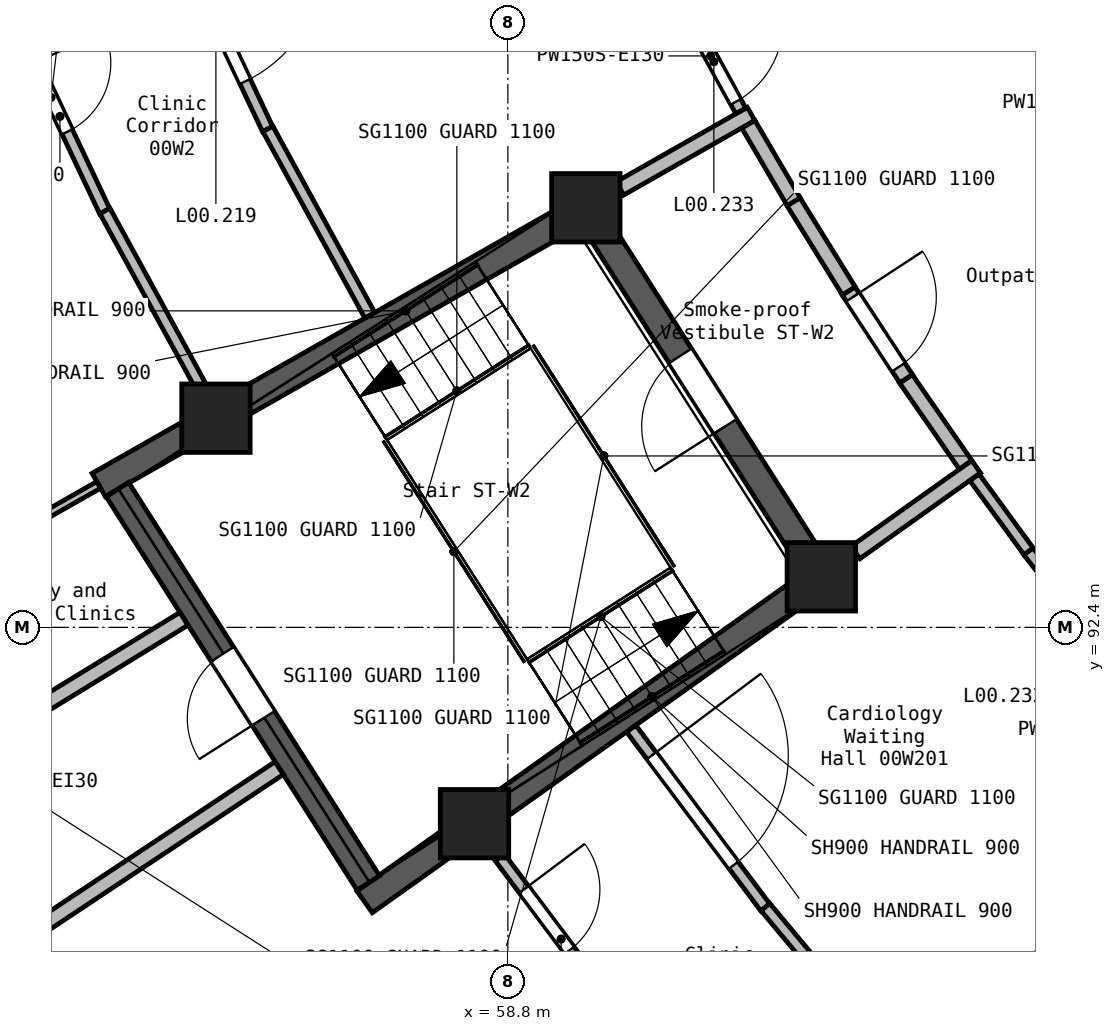
"""IFC4 building model, lengths in metres.
Left out: names, types, materials, properties, quantities, classifications, styles, units other than length and angle.
Written with IfcOpenShell. Run it as: python <this file> out.ifc"""

import sys

from ifc_helpers import new_model, si_unit, direction, frame, frame_2d, origin, origin_2d, place, context, subcontext, project, spatial, rectangle, extrude, element, fill, save


model = new_model("IFC4")
c1 = context("Model", 3, precision=1e-05, world=origin(), true_north=direction((0.0, 1.0)))
c2 = subcontext(c1, "Body", "Model", "MODEL_VIEW")
j1 = project(units=[si_unit("LENGTHUNIT", "METRE"), si_unit("PLANEANGLEUNIT", "RADIAN")], contexts=[c1])
p1 = place(None, origin())
s1 = spatial("IfcSite", under=j1, at=p1, CompositionType="ELEMENT")
p2 = place(p1, origin())
s2 = spatial("IfcBuilding", under=s1, at=p2, CompositionType="ELEMENT")
p3 = place(p2, origin())
s3 = spatial("IfcBuildingStorey", under=s2, at=p3, CompositionType="ELEMENT", Elevation=0.0)
for number, where, z_axis, x_axis in (
    (1, (54.959, 95.152, -0.3), (0.0, 0.0, 1.0), (1.0, 0.0, 0.0)),
    (2, (58.361, 89.817, -0.3), (0.0, 0.0, 1.0), (1.0, 0.0, 0.0)),
    (3, (59.826, 97.92, -0.3), (0.0, 0.0, 1.0), (1.0, 0.0, 0.0)),
    (4, (62.924, 93.065, -0.3), (0.0, 0.0, 1.0), (1.0, 0.0, 0.0)),
):
    element("IfcColumn", number, at=place(p3, frame(where, z_axis=z_axis, x_axis=x_axis)), inside=s3, PredefinedType="COLUMN", context=c2, shape_type="SweptSolid", body=[
        extrude(rectangle(XDim=0.9, YDim=0.9, at=origin_2d()), origin(), (0.0, 0.0, 1.0), 5.7),
    ])
p4 = place(p3, frame((53.416, 94.274, -0.3), z_axis=(0.0, 0.0, 1.0), x_axis=(0.869250335475, 0.494372181941, 0.0)))
e5 = element("IfcWall", 5, at=p4, inside=s3, PredefinedType="SHEAR", context=c2, shape_type="SweptSolid", body=[
    extrude(rectangle(XDim=7.549, YDim=0.35, at=frame_2d((3.775, 0.0))), origin(), (0.0, 0.0, 1.0), 5.7),
])
p5 = place(p3, frame((56.916, 88.789, -0.3), z_axis=(0.0, 0.0, 1.0), x_axis=(0.814717690591, 0.579857814157, 0.0)))
e6 = element("IfcWall", 6, at=p5, inside=s3, PredefinedType="SHEAR", context=c2, shape_type="SweptSolid", body=[
    extrude(rectangle(XDim=7.55, YDim=0.35, at=frame_2d((3.775, 0.0))), origin(), (0.0, 0.0, 1.0), 5.7),
])
p6 = place(p3, frame((56.964, 89.038, -0.3), z_axis=(0.0, 0.0, 1.0), x_axis=(-0.537811796172, 0.843064927451, 0.0)))
e7 = element("IfcWall", 7, at=p6, inside=s3, PredefinedType="SHEAR", context=c2, shape_type="SweptSolid", body=[
    extrude(rectangle(XDim=6.139, YDim=0.35, at=frame_2d((3.07, 0.0))), origin(), (0.0, 0.0, 1.0), 5.7),
])
p7 = place(p6, frame((2.569, 0.0, 0.3)))
e8 = element("IfcOpeningElement", 8, at=p7, cuts=e7, PredefinedType="OPENING", context=c2, shape_type="SweptSolid", body=[
    extrude(rectangle(XDim=1.0, YDim=2.1, at=frame_2d((0.5, 1.05))), frame((0.0, 0.185, 0.0), z_axis=(0.0, -1.0, 0.0), x_axis=(1.0, 0.0, 0.0)), (0.0, 0.0, 1.0), 0.37),
])
p8 = place(p3, frame((62.305, 84.872, -0.3), z_axis=(0.0, 0.0, 1.0), x_axis=(0.751808220443, 0.659381831471, 0.0)))
e9 = element("IfcWall", 9, at=p8, inside=s3, PredefinedType="SHEAR", context=c2, shape_type="SweptSolid", body=[
    extrude(rectangle(XDim=5.75, YDim=0.35, at=frame_2d((2.875, 0.0))), origin(), (0.0, 0.0, 1.0), 5.7),
])
p9 = place(p3, frame((62.83, 93.212, -0.3), z_axis=(0.0, 0.0, 1.0), x_axis=(-0.537903079352, 0.843006688718, 0.0)))
e10 = element("IfcWall", 10, at=p9, inside=s3, PredefinedType="SHEAR", context=c2, shape_type="SweptSolid", body=[
    extrude(rectangle(XDim=5.409, YDim=0.35, at=frame_2d((2.705, 0.0))), origin(), (0.0, 0.0, 1.0), 5.7),
])
p10 = place(p9, frame((2.174, 0.0, 0.3)))
e11 = element("IfcOpeningElement", 11, at=p10, cuts=e10, PredefinedType="OPENING", context=c2, shape_type="SweptSolid", body=[
    extrude(rectangle(XDim=1.1, YDim=2.1, at=frame_2d((0.55, 1.05))), frame((0.0, 0.185, 0.0), z_axis=(0.0, -1.0, 0.0), x_axis=(1.0, 0.0, 0.0)), (0.0, 0.0, 1.0), 0.37),
])
p11 = place(p3, frame((51.154, 87.47, 0.0), z_axis=(0.0, 0.0, 1.0), x_axis=(0.833115109658, 0.553099642071, 0.0)))
e12 = element("IfcWall", 12, at=p11, inside=s3, PredefinedType="SOLIDWALL", context=c2, shape_type="SweptSolid", body=[
    extrude(rectangle(XDim=5.565, YDim=0.2, at=frame_2d((2.783, 0.0))), origin(), (0.0, 0.0, 1.0), 5.05),
])
p12 = place(p3, frame((49.792, 89.605, 0.0), z_axis=(0.0, 0.0, 1.0), x_axis=(0.852773952769, 0.522280179098, 0.0)))
e13 = element("IfcWall", 13, at=p12, inside=s3, PredefinedType="SOLIDWALL", context=c2, shape_type="SweptSolid", body=[
    extrude(rectangle(XDim=5.565, YDim=0.2, at=frame_2d((2.783, 0.0))), origin(), (0.0, 0.0, 1.0), 5.05),
])
p13 = place(p12, frame((2.173, 0.0, 0.0)))
e14 = element("IfcOpeningElement", 14, at=p13, cuts=e13, PredefinedType="OPENING", context=c2, shape_type="SweptSolid", body=[
    extrude(rectangle(XDim=1.0, YDim=2.1, at=frame_2d((0.5, 1.05))), frame((0.0, 0.11, 0.0), z_axis=(0.0, -1.0, 0.0), x_axis=(1.0, 0.0, 0.0)), (0.0, 0.0, 1.0), 0.22),
])
p14 = place(p3, frame((60.274, 98.175, 0.0), z_axis=(0.0, 0.0, 1.0), x_axis=(0.869398915424, 0.494110843698, 0.0)))
e15 = element("IfcWall", 15, at=p14, inside=s3, PredefinedType="SOLIDWALL", context=c2, shape_type="SweptSolid", body=[
    extrude(rectangle(XDim=1.985, YDim=0.2, at=frame_2d((0.992, 0.0))), origin(), (0.0, 0.0, 1.0), 5.05),
])
p15 = place(p3, frame((63.374, 93.385, 0.0), z_axis=(0.0, 0.0, 1.0), x_axis=(0.814765781477, 0.579790239081, 0.0)))
e16 = element("IfcWall", 16, at=p15, inside=s3, PredefinedType="SOLIDWALL", context=c2, shape_type="SweptSolid", body=[
    extrude(rectangle(XDim=1.947, YDim=0.2, at=frame_2d((0.974, 0.0))), origin(), (0.0, 0.0, 1.0), 5.05),
])
p16 = place(p3, frame((64.036, 95.672, 0.0), z_axis=(0.0, 0.0, 1.0), x_axis=(0.569771647524, -0.821803060153, 0.0)))
e17 = element("IfcWall", 17, at=p16, inside=s3, PredefinedType="SOLIDWALL", context=c2, shape_type="SweptSolid", body=[
    extrude(rectangle(XDim=1.378, YDim=0.2, at=frame_2d((0.689, 0.0))), origin(), (0.0, 0.0, 1.0), 5.05),
])
p17 = place(p3, frame((63.282, 96.828, 0.0), z_axis=(0.0, 0.0, 1.0), x_axis=(0.54791545279, -0.836533715156, 0.0)))
e18 = element("IfcWall", 18, at=p17, inside=s3, PredefinedType="SOLIDWALL", context=c2, shape_type="SweptSolid", body=[
    extrude(rectangle(XDim=1.382, YDim=0.2, at=frame_2d((0.691, 0.0))), origin(), (0.0, 0.0, 1.0), 5.05),
])
p18 = place(p17, frame((0.1, 0.0, 0.0)))
e19 = element("IfcOpeningElement", 19, at=p18, cuts=e18, PredefinedType="OPENING", context=c2, shape_type="SweptSolid", body=[
    extrude(rectangle(XDim=1.1, YDim=2.1, at=frame_2d((0.55, 1.05))), frame((0.0, 0.11, 0.0), z_axis=(0.0, -1.0, 0.0), x_axis=(1.0, 0.0, 0.0)), (0.0, 0.0, 1.0), 0.22),
])
p19 = place(p3, frame((62.557, 98.001, 0.0), z_axis=(0.0, 0.0, 1.0), x_axis=(0.526993282669, -0.849869448811, 0.0)))
e20 = element("IfcWall", 20, at=p19, inside=s3, PredefinedType="SOLIDWALL", context=c2, shape_type="SweptSolid", body=[
    extrude(rectangle(XDim=1.382, YDim=0.2, at=frame_2d((0.691, 0.0))), origin(), (0.0, 0.0, 1.0), 5.05),
])
p20 = place(p3, frame((61.964, 99.019, 0.0), z_axis=(0.0, 0.0, 1.0), x_axis=(0.505554921375, -0.862794425963, 0.0)))
e21 = element("IfcWall", 21, at=p20, inside=s3, PredefinedType="SOLIDWALL", context=c2, shape_type="SweptSolid", body=[
    extrude(rectangle(XDim=1.18, YDim=0.2, at=frame_2d((0.59, 0.0))), origin(), (0.0, 0.0, 1.0), 5.05),
])
p21 = place(p3, frame((58.695, 89.373, 0.0), z_axis=(0.0, 0.0, 1.0), x_axis=(0.600189191088, -0.799858071724, 0.0)))
e22 = element("IfcWall", 22, at=p21, inside=s3, PredefinedType="PARTITIONING", context=c2, shape_type="SweptSolid", body=[
    extrude(rectangle(XDim=2.684, YDim=0.15, at=frame_2d((1.342, 0.0))), origin(), (0.0, 0.0, 1.0), 5.05),
])
p22 = place(p21, frame((0.526, 0.0, 0.0)))
e23 = element("IfcOpeningElement", 23, at=p22, cuts=e22, PredefinedType="OPENING", context=c2, shape_type="SweptSolid", body=[
    extrude(rectangle(XDim=1.0, YDim=2.1, at=frame_2d((0.5, 1.05))), frame((0.0, 0.085, 0.0), z_axis=(0.0, -1.0, 0.0), x_axis=(1.0, 0.0, 0.0)), (0.0, 0.0, 1.0), 0.17),
])
p23 = place(p3, frame((52.317, 100.372, 0.0), z_axis=(0.0, 0.0, 1.0), x_axis=(0.426699152938, -0.904393627179, 0.0)))
e24 = element("IfcWall", 24, at=p23, inside=s3, PredefinedType="PARTITIONING", context=c2, shape_type="SweptSolid", body=[
    extrude(rectangle(XDim=2.762, YDim=0.15, at=frame_2d((1.381, 0.0))), origin(), (0.0, 0.0, 1.0), 5.05),
])
p24 = place(p23, frame((0.605, 0.0, 0.0)))
e25 = element("IfcOpeningElement", 25, at=p24, cuts=e24, PredefinedType="OPENING", context=c2, shape_type="SweptSolid", body=[
    extrude(rectangle(XDim=1.0, YDim=2.1, at=frame_2d((0.5, 1.05))), frame((0.0, 0.085, 0.0), z_axis=(0.0, -1.0, 0.0), x_axis=(1.0, 0.0, 0.0)), (0.0, 0.0, 1.0), 0.17),
])
p25 = place(p3, frame((53.498, 97.879, 0.0), z_axis=(0.0, 0.0, 1.0), x_axis=(0.479886541842, -0.877330557407, 0.0)))
e26 = element("IfcWall", 26, at=p25, inside=s3, PredefinedType="PARTITIONING", context=c2, shape_type="SweptSolid", body=[
    extrude(rectangle(XDim=2.612, YDim=0.15, at=frame_2d((1.306, 0.0))), origin(), (0.0, 0.0, 1.0), 5.05),
])
p26 = place(p3, frame((54.277, 101.84, 0.0), z_axis=(0.0, 0.0, 1.0), x_axis=(0.426790955489, -0.904350308405, 0.0)))
e27 = element("IfcWall", 27, at=p26, inside=s3, PredefinedType="PARTITIONING", context=c2, shape_type="SweptSolid", body=[
    extrude(rectangle(XDim=3.193, YDim=0.15, at=frame_2d((1.597, 0.0))), origin(), (0.0, 0.0, 1.0), 5.05),
])
p27 = place(p26, frame((0.697, 0.0, 0.0)))
e28 = element("IfcOpeningElement", 28, at=p27, cuts=e27, PredefinedType="OPENING", context=c2, shape_type="SweptSolid", body=[
    extrude(rectangle(XDim=1.8, YDim=2.1, at=frame_2d((0.9, 1.05))), frame((0.0, 0.085, 0.0), z_axis=(0.0, -1.0, 0.0), x_axis=(1.0, 0.0, 0.0)), (0.0, 0.0, 1.0), 0.17),
])
p28 = place(p3, frame((60.423, 91.068, 0.0), z_axis=(0.0, 0.0, 1.0), x_axis=(0.600119519183, -0.799910346661, 0.0)))
e29 = element("IfcWall", 29, at=p28, inside=s3, PredefinedType="PARTITIONING", context=c2, shape_type="SweptSolid", body=[
    extrude(rectangle(XDim=2.941, YDim=0.15, at=frame_2d((1.471, 0.0))), origin(), (0.0, 0.0, 1.0), 5.05),
])
p29 = place(p28, frame((0.445, 0.0, 0.0)))
e30 = element("IfcOpeningElement", 30, at=p29, cuts=e29, PredefinedType="OPENING", context=c2, shape_type="SweptSolid", body=[
    extrude(rectangle(XDim=1.8, YDim=2.1, at=frame_2d((0.9, 1.05))), frame((0.0, 0.085, 0.0), z_axis=(0.0, -1.0, 0.0), x_axis=(1.0, 0.0, 0.0)), (0.0, 0.0, 1.0), 0.17),
])
p30 = place(p3, frame((62.189, 88.72, 0.0), z_axis=(0.0, 0.0, 1.0), x_axis=(0.640253147886, -0.7681639842, 0.0)))
e31 = element("IfcWall", 31, at=p30, inside=s3, PredefinedType="PARTITIONING", context=c2, shape_type="SweptSolid", body=[
    extrude(rectangle(XDim=2.794, YDim=0.15, at=frame_2d((1.397, 0.0))), origin(), (0.0, 0.0, 1.0), 5.05),
])
p31 = place(p3, frame((55.642, 98.958, 0.0), z_axis=(0.0, 0.0, 1.0), x_axis=(0.479861725731, -0.877344130988, 0.0)))
e32 = element("IfcWall", 32, at=p31, inside=s3, PredefinedType="PARTITIONING", context=c2, shape_type="SweptSolid", body=[
    extrude(rectangle(XDim=2.795, YDim=0.15, at=frame_2d((1.397, 0.0))), origin(), (0.0, 0.0, 1.0), 5.05),
])
p32 = place(p3, frame((65.647, 93.401, 0.0), z_axis=(0.0, 0.0, 1.0), x_axis=(0.615999292534, -0.787746705228, 0.0)))
e33 = element("IfcWall", 33, at=p32, inside=s3, PredefinedType="PARTITIONING", context=c2, shape_type="SweptSolid", body=[
    extrude(rectangle(XDim=2.28, YDim=0.15, at=frame_2d((1.14, 0.0))), origin(), (0.0, 0.0, 1.0), 5.05),
])
p33 = place(p32, frame((0.24, 0.0, 0.0)))
e34 = element("IfcOpeningElement", 34, at=p33, cuts=e33, PredefinedType="OPENING", context=c2, shape_type="SweptSolid", body=[
    extrude(rectangle(XDim=1.8, YDim=2.1, at=frame_2d((0.9, 1.05))), frame((0.0, 0.085, 0.0), z_axis=(0.0, -1.0, 0.0), x_axis=(1.0, 0.0, 0.0)), (0.0, 0.0, 1.0), 0.17),
])
p34 = place(p3, frame((61.071, 100.641, 0.0), z_axis=(0.0, 0.0, 1.0), x_axis=(0.481122709727, -0.876653259952, 0.0)))
e35 = element("IfcWall", 35, at=p34, inside=s3, PredefinedType="PARTITIONING", context=c2, shape_type="SweptSolid", body=[
    extrude(rectangle(XDim=1.649, YDim=0.15, at=frame_2d((0.824, 0.0))), origin(), (0.0, 0.0, 1.0), 5.05),
])
p35 = place(p34, frame((0.313, 0.0, 0.0)))
e36 = element("IfcOpeningElement", 36, at=p35, cuts=e35, PredefinedType="OPENING", context=c2, shape_type="SweptSolid", body=[
    extrude(rectangle(XDim=1.2, YDim=2.1, at=frame_2d((0.6, 1.05))), frame((0.0, 0.085, 0.0), z_axis=(0.0, -1.0, 0.0), x_axis=(1.0, 0.0, 0.0)), (0.0, 0.0, 1.0), 0.17),
])
p36 = place(p3, frame((64.939, 94.374, 0.0), z_axis=(0.0, 0.0, 1.0), x_axis=(0.589904843898, -0.807472770529, 0.0)))
e37 = element("IfcWall", 37, at=p36, inside=s3, PredefinedType="PARTITIONING", context=c2, shape_type="SweptSolid", body=[
    extrude(rectangle(XDim=1.205, YDim=0.15, at=frame_2d((0.603, 0.0))), origin(), (0.0, 0.0, 1.0), 5.05),
])
p37 = place(p3, frame((50.515, 92.624, 0.0), z_axis=(0.0, 0.0, 1.0), x_axis=(0.869240805435, 0.494388938152, 0.0)))
e38 = element("IfcWall", 38, at=p37, inside=s3, PredefinedType="PARTITIONING", context=c2, shape_type="SweptSolid", body=[
    extrude(rectangle(XDim=3.337, YDim=0.1, at=frame_2d((1.668, 0.0))), origin(), (0.0, 0.0, 1.0), 5.05),
])
p38 = place(p29, frame((1.8, 0.0, 0.0), z_axis=(0.0, 0.0, 1.0), x_axis=(-1.0, 0.0, 0.0)))
e39 = element("IfcDoor", 39, at=p38, inside=s3, OperationType="DOUBLE_DOOR_SINGLE_SWING", PredefinedType="DOOR", context=c2, shape_type="SweptSolid", body=[
    extrude(rectangle(XDim=1.8, YDim=2.1, at=frame_2d((0.9, 1.05))), frame((0.0, 0.025, 0.0), z_axis=(0.0, -1.0, 0.0), x_axis=(1.0, 0.0, 0.0)), (0.0, 0.0, 1.0), 0.05),
])
fill(e30, e39)
p39 = place(p27, frame((1.8, 0.0, 0.0), z_axis=(0.0, 0.0, 1.0), x_axis=(-1.0, 0.0, 0.0)))
e40 = element("IfcDoor", 40, at=p39, inside=s3, OperationType="DOUBLE_DOOR_SINGLE_SWING", PredefinedType="DOOR", context=c2, shape_type="SweptSolid", body=[
    extrude(rectangle(XDim=1.8, YDim=2.1, at=frame_2d((0.9, 1.05))), frame((0.0, 0.025, 0.0), z_axis=(0.0, -1.0, 0.0), x_axis=(1.0, 0.0, 0.0)), (0.0, 0.0, 1.0), 0.05),
])
fill(e28, e40)
p40 = place(p35, origin())
e41 = element("IfcDoor", 41, at=p40, inside=s3, OperationType="SINGLE_SWING_RIGHT", PredefinedType="DOOR", context=c2, shape_type="SweptSolid", body=[
    extrude(rectangle(XDim=1.2, YDim=2.1, at=frame_2d((0.6, 1.05))), frame((0.0, 0.025, 0.0), z_axis=(0.0, -1.0, 0.0), x_axis=(1.0, 0.0, 0.0)), (0.0, 0.0, 1.0), 0.05),
])
fill(e36, e41)
p41 = place(p7, origin())
e42 = element("IfcDoor", 42, at=p41, inside=s3, OperationType="SINGLE_SWING_LEFT", PredefinedType="DOOR", context=c2, shape_type="SweptSolid", body=[
    extrude(rectangle(XDim=1.0, YDim=2.1, at=frame_2d((0.5, 1.05))), frame((0.0, 0.025, 0.0), z_axis=(0.0, -1.0, 0.0), x_axis=(1.0, 0.0, 0.0)), (0.0, 0.0, 1.0), 0.05),
])
fill(e8, e42)
p42 = place(p22, frame((1.0, 0.0, 0.0), z_axis=(0.0, 0.0, 1.0), x_axis=(-1.0, 0.0, 0.0)))
e43 = element("IfcDoor", 43, at=p42, inside=s3, OperationType="SINGLE_SWING_RIGHT", PredefinedType="DOOR", context=c2, shape_type="SweptSolid", body=[
    extrude(rectangle(XDim=1.0, YDim=2.1, at=frame_2d((0.5, 1.05))), frame((0.0, 0.025, 0.0), z_axis=(0.0, -1.0, 0.0), x_axis=(1.0, 0.0, 0.0)), (0.0, 0.0, 1.0), 0.05),
])
fill(e23, e43)
p43 = place(p24, frame((1.0, 0.0, 0.0), z_axis=(0.0, 0.0, 1.0), x_axis=(-1.0, 0.0, 0.0)))
e44 = element("IfcDoor", 44, at=p43, inside=s3, OperationType="SINGLE_SWING_RIGHT", PredefinedType="DOOR", context=c2, shape_type="SweptSolid", body=[
    extrude(rectangle(XDim=1.0, YDim=2.1, at=frame_2d((0.5, 1.05))), frame((0.0, 0.025, 0.0), z_axis=(0.0, -1.0, 0.0), x_axis=(1.0, 0.0, 0.0)), (0.0, 0.0, 1.0), 0.05),
])
fill(e25, e44)
p44 = place(p10, origin())
e45 = element("IfcDoor", 45, at=p44, inside=s3, OperationType="SINGLE_SWING_RIGHT", PredefinedType="DOOR", context=c2, shape_type="SweptSolid", body=[
    extrude(rectangle(XDim=1.1, YDim=2.1, at=frame_2d((0.55, 1.05))), frame((0.0, 0.025, 0.0), z_axis=(0.0, -1.0, 0.0), x_axis=(1.0, 0.0, 0.0)), (0.0, 0.0, 1.0), 0.05),
])
fill(e11, e45)
p45 = place(p18, frame((1.1, 0.0, 0.0), z_axis=(0.0, 0.0, 1.0), x_axis=(-1.0, 0.0, 0.0)))
e46 = element("IfcDoor", 46, at=p45, inside=s3, OperationType="SINGLE_SWING_RIGHT", PredefinedType="DOOR", context=c2, shape_type="SweptSolid", body=[
    extrude(rectangle(XDim=1.1, YDim=2.1, at=frame_2d((0.55, 1.05))), frame((0.0, 0.025, 0.0), z_axis=(0.0, -1.0, 0.0), x_axis=(1.0, 0.0, 0.0)), (0.0, 0.0, 1.0), 0.05),
])
fill(e19, e46)
save(model, sys.argv[1])
